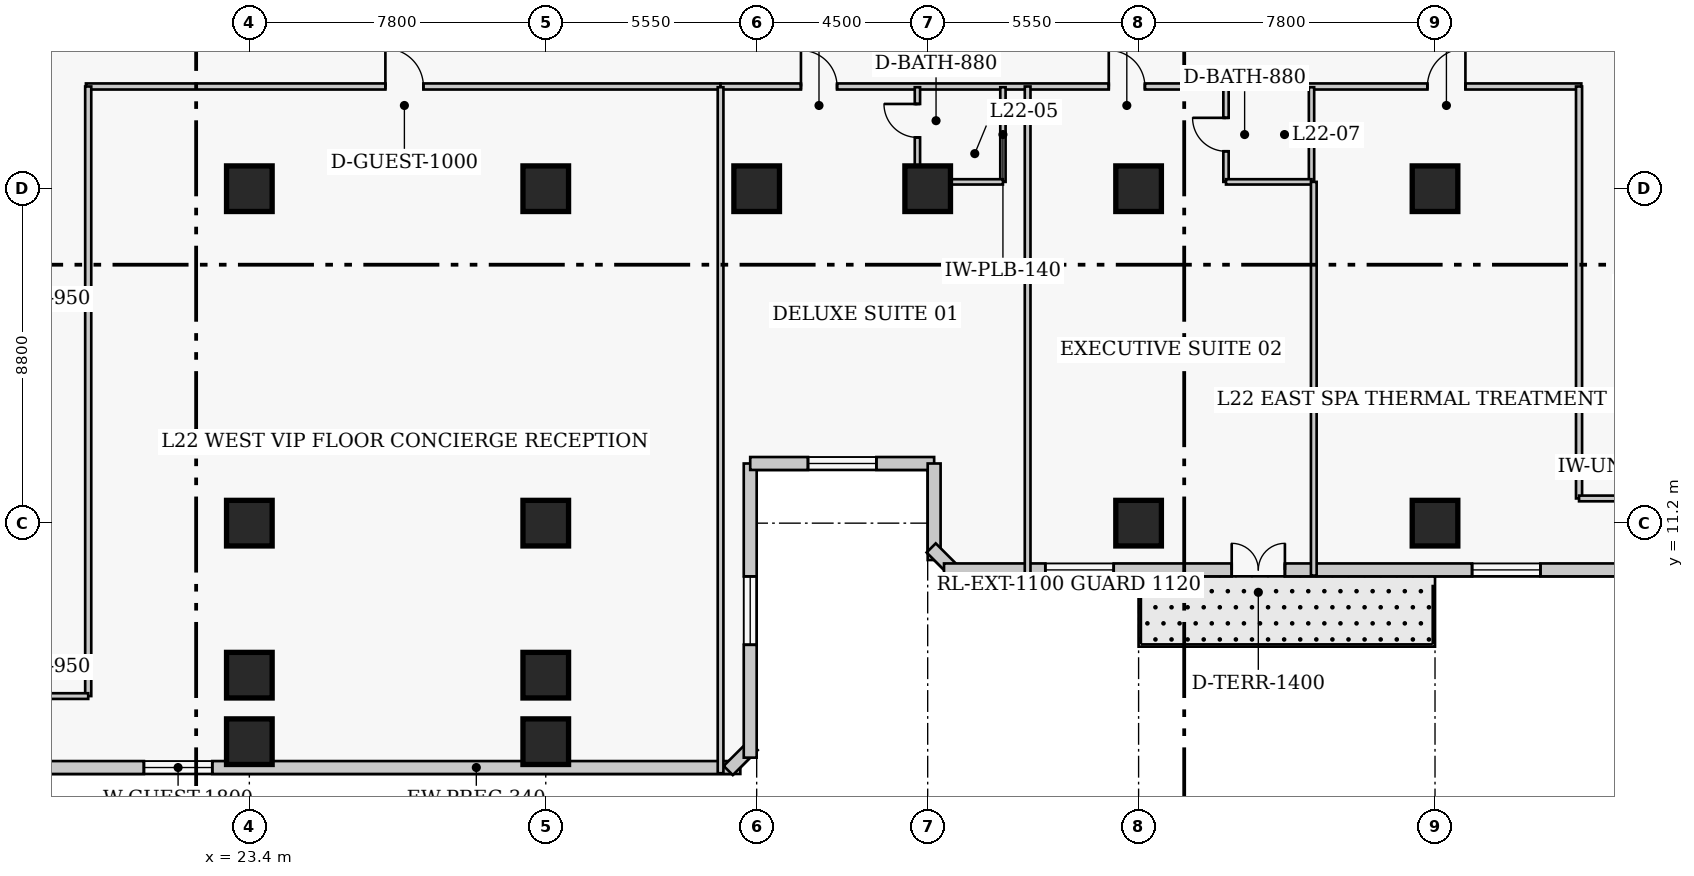
"""IFC4 building model, lengths in metres.
Left out: names, types, materials, properties, quantities, classifications, styles, units other than length and angle.
Written with IfcOpenShell. Run it as: python <this file> out.ifc"""

import sys

from ifc_helpers import new_model, si_unit, direction, frame, frame_2d, origin, origin_2d, place, context, subcontext, project, spatial, rectangle, extrude, element, fill, save


model = new_model("IFC4")
c1 = context("Model", 3, precision=1e-05, world=origin(), true_north=direction((0.0, 1.0)))
c2 = subcontext(c1, "Body", "Model", "MODEL_VIEW")
j1 = project(units=[si_unit("LENGTHUNIT", "METRE"), si_unit("PLANEANGLEUNIT", "RADIAN")], contexts=[c1])
p1 = place(None, origin())
s1 = spatial("IfcSite", under=j1, at=p1, CompositionType="ELEMENT")
p2 = place(p1, origin())
s2 = spatial("IfcBuilding", under=s1, at=p2, CompositionType="ELEMENT")
p3 = place(p2, frame((0.0, 0.0, 91.8)))
s3 = spatial("IfcBuildingStorey", under=s2, at=p3, CompositionType="ELEMENT", Elevation=91.8)
for number, where, z_axis, x_axis in (
    (1, (23.4, 11.2, 0.0), (0.0, 0.0, 1.0), (1.0, 0.0, 0.0)),
    (2, (23.4, 20.0, 0.0), (0.0, 0.0, 1.0), (1.0, 0.0, 0.0)),
    (3, (31.2, 11.2, 0.0), (0.0, 0.0, 1.0), (1.0, 0.0, 0.0)),
    (4, (31.2, 20.0, 0.0), (0.0, 0.0, 1.0), (1.0, 0.0, 0.0)),
    (5, (36.75, 20.0, 0.0), (0.0, 0.0, 1.0), (1.0, 0.0, 0.0)),
    (6, (41.25, 20.0, 0.0), (0.0, 0.0, 1.0), (1.0, 0.0, 0.0)),
    (7, (46.8, 11.2, 0.0), (0.0, 0.0, 1.0), (1.0, 0.0, 0.0)),
    (8, (46.8, 20.0, 0.0), (0.0, 0.0, 1.0), (1.0, 0.0, 0.0)),
    (9, (54.6, 11.2, 0.0), (0.0, 0.0, 1.0), (1.0, 0.0, 0.0)),
    (10, (54.6, 20.0, 0.0), (0.0, 0.0, 1.0), (1.0, 0.0, 0.0)),
    (11, (23.4, 7.2, 0.0), (0.0, 0.0, 1.0), (1.0, 0.0, 0.0)),
    (12, (31.2, 7.2, 0.0), (0.0, 0.0, 1.0), (1.0, 0.0, 0.0)),
    (13, (23.4, 5.45, 0.0), (0.0, 0.0, 1.0), (1.0, 0.0, 0.0)),
    (14, (31.2, 5.45, 0.0), (0.0, 0.0, 1.0), (1.0, 0.0, 0.0)),
):
    element("IfcColumn", number, at=place(p3, frame(where, z_axis=z_axis, x_axis=x_axis)), inside=s3, PredefinedType="COLUMN", context=c2, shape_type="SweptSolid", body=[
        extrude(rectangle(XDim=1.2, YDim=1.2, at=origin_2d()), origin(), (0.0, 0.0, 1.0), 3.8),
    ])
p4 = place(p3, frame((8.03, 4.77, 0.0), z_axis=(0.0, 0.0, 1.0), x_axis=(1.0, 0.0, 0.0)))
e15 = element("IfcWall", 15, at=p4, inside=s3, PredefinedType="SOLIDWALL", context=c2, shape_type="SweptSolid", body=[
    extrude(rectangle(XDim=28.29, YDim=0.34, at=frame_2d((14.145, 0.0))), origin(), (0.0, 0.0, 1.0), 3.54),
])
p5 = place(p4, frame((12.595, 0.0, 0.85)))
e16 = element("IfcOpeningElement", 16, at=p5, cuts=e15, PredefinedType="OPENING", context=c2, shape_type="SweptSolid", body=[
    extrude(rectangle(XDim=1.8, YDim=1.8, at=frame_2d((0.9, 0.9))), frame((0.0, 0.18, 0.0), z_axis=(0.0, -1.0, 0.0), x_axis=(1.0, 0.0, 0.0)), (0.0, 0.0, 1.0), 0.36),
])
p6 = place(p3, frame((36.001, 4.692, 0.0), z_axis=(0.0, 0.0, 1.0), x_axis=(0.707238225886, 0.706975312048, 0.0)))
e17 = element("IfcWall", 17, at=p6, inside=s3, PredefinedType="SOLIDWALL", context=c2, shape_type="SweptSolid", body=[
    extrude(rectangle(XDim=0.929, YDim=0.34, at=frame_2d((0.464, 0.0))), origin(), (0.0, 0.0, 1.0), 3.54),
])
p7 = place(p3, frame((36.58, 5.03, 0.0), z_axis=(0.0, 0.0, 1.0), x_axis=(0.0, 1.0, 0.0)))
e18 = element("IfcWall", 18, at=p7, inside=s3, PredefinedType="SOLIDWALL", context=c2, shape_type="SweptSolid", body=[
    extrude(rectangle(XDim=7.74, YDim=0.34, at=frame_2d((3.87, 0.0))), origin(), (0.0, 0.0, 1.0), 3.54),
])
p8 = place(p7, frame((2.97, 0.0, 0.85)))
e19 = element("IfcOpeningElement", 19, at=p8, cuts=e18, PredefinedType="OPENING", context=c2, shape_type="SweptSolid", body=[
    extrude(rectangle(XDim=1.8, YDim=1.8, at=frame_2d((0.9, 0.9))), frame((0.0, 0.18, 0.0), z_axis=(0.0, -1.0, 0.0), x_axis=(1.0, 0.0, 0.0)), (0.0, 0.0, 1.0), 0.36),
])
p9 = place(p3, frame((36.58, 12.77, 0.0), z_axis=(0.0, 0.0, 1.0), x_axis=(1.0, 0.0, 0.0)))
e20 = element("IfcWall", 20, at=p9, inside=s3, PredefinedType="SOLIDWALL", context=c2, shape_type="SweptSolid", body=[
    extrude(rectangle(XDim=4.84, YDim=0.34, at=frame_2d((2.42, 0.0))), origin(), (0.0, 0.0, 1.0), 3.54),
])
p10 = place(p9, frame((1.52, 0.0, 0.85)))
e21 = element("IfcOpeningElement", 21, at=p10, cuts=e20, PredefinedType="OPENING", context=c2, shape_type="SweptSolid", body=[
    extrude(rectangle(XDim=1.8, YDim=1.8, at=frame_2d((0.9, 0.9))), frame((0.0, 0.18, 0.0), z_axis=(0.0, -1.0, 0.0), x_axis=(1.0, 0.0, 0.0)), (0.0, 0.0, 1.0), 0.36),
])
p11 = place(p3, frame((41.42, 12.77, 0.0), z_axis=(0.0, 0.0, 1.0), x_axis=(0.0, -1.0, 0.0)))
e22 = element("IfcWall", 22, at=p11, inside=s3, PredefinedType="SOLIDWALL", context=c2, shape_type="SweptSolid", body=[
    extrude(rectangle(XDim=2.54, YDim=0.34, at=frame_2d((1.27, 0.0))), origin(), (0.0, 0.0, 1.0), 3.54),
])
p12 = place(p3, frame((41.342, 10.549, 0.0), z_axis=(0.0, 0.0, 1.0), x_axis=(0.707106781187, -0.707106781187, 0.0)))
e23 = element("IfcWall", 23, at=p12, inside=s3, PredefinedType="SOLIDWALL", context=c2, shape_type="SweptSolid", body=[
    extrude(rectangle(XDim=0.929, YDim=0.34, at=frame_2d((0.464, 0.0))), origin(), (0.0, 0.0, 1.0), 3.54),
])
p13 = place(p3, frame((41.68, 9.97, 0.0), z_axis=(0.0, 0.0, 1.0), x_axis=(1.0, 0.0, 0.0)))
e24 = element("IfcWall", 24, at=p13, inside=s3, PredefinedType="SOLIDWALL", context=c2, shape_type="SweptSolid", body=[
    extrude(rectangle(XDim=28.29, YDim=0.34, at=frame_2d((14.145, 0.0))), origin(), (0.0, 0.0, 1.0), 3.54),
])
p14 = place(p13, frame((7.57, 0.0, 0.0)))
e25 = element("IfcOpeningElement", 25, at=p14, cuts=e24, PredefinedType="OPENING", context=c2, shape_type="SweptSolid", body=[
    extrude(rectangle(XDim=1.4, YDim=2.15, at=frame_2d((0.7, 1.075))), frame((0.0, 0.18, 0.0), z_axis=(0.0, -1.0, 0.0), x_axis=(1.0, 0.0, 0.0)), (0.0, 0.0, 1.0), 0.36),
])
p15 = place(p13, frame((2.665, 0.0, 0.85)))
e26 = element("IfcOpeningElement", 26, at=p15, cuts=e24, PredefinedType="OPENING", context=c2, shape_type="SweptSolid", body=[
    extrude(rectangle(XDim=1.8, YDim=1.8, at=frame_2d((0.9, 0.9))), frame((0.0, 0.18, 0.0), z_axis=(0.0, -1.0, 0.0), x_axis=(1.0, 0.0, 0.0)), (0.0, 0.0, 1.0), 0.36),
])
p16 = place(p13, frame((13.895, 0.0, 0.85)))
e27 = element("IfcOpeningElement", 27, at=p16, cuts=e24, PredefinedType="OPENING", context=c2, shape_type="SweptSolid", body=[
    extrude(rectangle(XDim=1.8, YDim=1.8, at=frame_2d((0.9, 0.9))), frame((0.0, 0.18, 0.0), z_axis=(0.0, -1.0, 0.0), x_axis=(1.0, 0.0, 0.0)), (0.0, 0.0, 1.0), 0.36),
])
p17 = place(p3, frame((19.1, 22.69, 0.0), z_axis=(0.0, 0.0, 1.0), x_axis=(1.0, 0.0, 0.0)))
e28 = element("IfcWall", 28, at=p17, inside=s3, PredefinedType="PARTITIONING", context=c2, shape_type="SweptSolid", body=[
    extrude(rectangle(XDim=16.7, YDim=0.16, at=frame_2d((8.35, 0.0))), origin(), (0.0, 0.0, 1.0), 3.54),
])
p18 = place(p17, frame((7.88, 0.0, 0.0)))
e29 = element("IfcOpeningElement", 29, at=p18, cuts=e28, PredefinedType="OPENING", context=c2, shape_type="SweptSolid", body=[
    extrude(rectangle(XDim=1.0, YDim=2.15, at=frame_2d((0.5, 1.075))), frame((0.0, 0.09, 0.0), z_axis=(0.0, -1.0, 0.0), x_axis=(1.0, 0.0, 0.0)), (0.0, 0.0, 1.0), 0.18),
])
p19 = place(p3, frame((35.8, 22.69, 0.0), z_axis=(0.0, 0.0, 1.0), x_axis=(1.0, 0.0, 0.0)))
e30 = element("IfcWall", 30, at=p19, inside=s3, PredefinedType="PARTITIONING", context=c2, shape_type="SweptSolid", body=[
    extrude(rectangle(XDim=22.65, YDim=0.16, at=frame_2d((11.325, 0.0))), origin(), (0.0, 0.0, 1.0), 3.54),
])
p20 = place(p19, frame((2.115, 0.0, 0.0)))
e31 = element("IfcOpeningElement", 31, at=p20, cuts=e30, PredefinedType="OPENING", context=c2, shape_type="SweptSolid", body=[
    extrude(rectangle(XDim=0.95, YDim=2.1, at=frame_2d((0.475, 1.05))), frame((0.0, 0.09, 0.0), z_axis=(0.0, -1.0, 0.0), x_axis=(1.0, 0.0, 0.0)), (0.0, 0.0, 1.0), 0.18),
])
p21 = place(p19, frame((10.215, 0.0, 0.0)))
e32 = element("IfcOpeningElement", 32, at=p21, cuts=e30, PredefinedType="OPENING", context=c2, shape_type="SweptSolid", body=[
    extrude(rectangle(XDim=0.95, YDim=2.1, at=frame_2d((0.475, 1.05))), frame((0.0, 0.09, 0.0), z_axis=(0.0, -1.0, 0.0), x_axis=(1.0, 0.0, 0.0)), (0.0, 0.0, 1.0), 0.18),
])
p22 = place(p19, frame((18.6, 0.0, 0.0)))
e33 = element("IfcOpeningElement", 33, at=p22, cuts=e30, PredefinedType="OPENING", context=c2, shape_type="SweptSolid", body=[
    extrude(rectangle(XDim=1.0, YDim=2.15, at=frame_2d((0.5, 1.075))), frame((0.0, 0.09, 0.0), z_axis=(0.0, -1.0, 0.0), x_axis=(1.0, 0.0, 0.0)), (0.0, 0.0, 1.0), 0.18),
])
p23 = place(p3, frame((19.16, 6.65, 0.0), z_axis=(0.0, 0.0, 1.0), x_axis=(0.0, 1.0, 0.0)))
e34 = element("IfcWall", 34, at=p23, inside=s3, PredefinedType="PARTITIONING", context=c2, shape_type="SweptSolid", body=[
    extrude(rectangle(XDim=16.04, YDim=0.16, at=frame_2d((8.02, 0.0))), origin(), (0.0, 0.0, 1.0), 3.54),
])
p24 = place(p3, frame((58.39, 11.85, 0.0), z_axis=(0.0, 0.0, 1.0), x_axis=(0.0, 1.0, 0.0)))
e35 = element("IfcWall", 35, at=p24, inside=s3, PredefinedType="PARTITIONING", context=c2, shape_type="SweptSolid", body=[
    extrude(rectangle(XDim=10.84, YDim=0.16, at=frame_2d((5.42, 0.0))), origin(), (0.0, 0.0, 1.0), 3.083),
])
p25 = place(p3, frame((58.39, 11.85, 0.0), z_axis=(0.0, 0.0, 1.0), x_axis=(1.0, 0.0, 0.0)))
e36 = element("IfcWall", 36, at=p25, inside=s3, PredefinedType="PARTITIONING", context=c2, shape_type="SweptSolid", body=[
    extrude(rectangle(XDim=2.22, YDim=0.15, at=frame_2d((1.11, 0.0))), origin(), (0.0, 0.0, 1.0), 3.54),
])
p26 = place(p3, frame((16.94, 6.65, 0.0), z_axis=(0.0, 0.0, 1.0), x_axis=(1.0, 0.0, 0.0)))
e37 = element("IfcWall", 37, at=p26, inside=s3, PredefinedType="PARTITIONING", context=c2, shape_type="SweptSolid", body=[
    extrude(rectangle(XDim=2.22, YDim=0.15, at=frame_2d((1.11, 0.0))), origin(), (0.0, 0.0, 1.0), 3.54),
])
p27 = place(p3, frame((35.8, 4.62, 0.0), z_axis=(0.0, 0.0, 1.0), x_axis=(0.0, 1.0, 0.0)))
e38 = element("IfcWall", 38, at=p27, inside=s3, PredefinedType="PARTITIONING", context=c2, shape_type="SweptSolid", body=[
    extrude(rectangle(XDim=18.05, YDim=0.15, at=frame_2d((9.025, 0.0))), origin(), (0.0, 0.0, 1.0), 3.54),
])
p28 = place(p3, frame((40.98, 20.18, 0.0), z_axis=(0.0, 0.0, 1.0), x_axis=(0.0, 1.0, 0.0)))
e39 = element("IfcWall", 39, at=p28, inside=s3, PredefinedType="PLUMBINGWALL", context=c2, shape_type="SweptSolid", body=[
    extrude(rectangle(XDim=2.49, YDim=0.14, at=frame_2d((1.245, 0.0))), origin(), (0.0, 0.0, 1.0), 3.54),
])
p29 = place(p28, frame((1.17, 0.0, 0.0)))
e40 = element("IfcOpeningElement", 40, at=p29, cuts=e39, PredefinedType="OPENING", context=c2, shape_type="SweptSolid", body=[
    extrude(rectangle(XDim=0.88, YDim=2.05, at=frame_2d((0.44, 1.025))), frame((0.0, 0.08, 0.0), z_axis=(0.0, -1.0, 0.0), x_axis=(1.0, 0.0, 0.0)), (0.0, 0.0, 1.0), 0.16),
])
p30 = place(p3, frame((43.23, 20.18, 0.0), z_axis=(0.0, 0.0, 1.0), x_axis=(0.0, 1.0, 0.0)))
e41 = element("IfcWall", 41, at=p30, inside=s3, PredefinedType="PLUMBINGWALL", context=c2, shape_type="SweptSolid", body=[
    extrude(rectangle(XDim=2.49, YDim=0.14, at=frame_2d((1.245, 0.0))), origin(), (0.0, 0.0, 1.0), 3.54),
])
p31 = place(p3, frame((40.98, 20.18, 0.0), z_axis=(0.0, 0.0, 1.0), x_axis=(1.0, 0.0, 0.0)))
e42 = element("IfcWall", 42, at=p31, inside=s3, PredefinedType="PLUMBINGWALL", context=c2, shape_type="SweptSolid", body=[
    extrude(rectangle(XDim=2.25, YDim=0.14, at=frame_2d((1.125, 0.0))), origin(), (0.0, 0.0, 1.0), 2.679),
])
p32 = place(p3, frame((43.88, 9.82, 0.0), z_axis=(0.0, 0.0, 1.0), x_axis=(0.0, 1.0, 0.0)))
e43 = element("IfcWall", 43, at=p32, inside=s3, PredefinedType="PARTITIONING", context=c2, shape_type="SweptSolid", body=[
    extrude(rectangle(XDim=12.87, YDim=0.15, at=frame_2d((6.435, 0.0))), origin(), (0.0, 0.0, 1.0), 3.54),
])
p33 = place(p3, frame((49.1, 20.18, 0.0), z_axis=(0.0, 0.0, 1.0), x_axis=(0.0, 1.0, 0.0)))
e44 = element("IfcWall", 44, at=p33, inside=s3, PredefinedType="PLUMBINGWALL", context=c2, shape_type="SweptSolid", body=[
    extrude(rectangle(XDim=2.49, YDim=0.14, at=frame_2d((1.245, 0.0))), origin(), (0.0, 0.0, 1.0), 3.54),
])
p34 = place(p33, frame((0.805, 0.0, 0.0)))
e45 = element("IfcOpeningElement", 45, at=p34, cuts=e44, PredefinedType="OPENING", context=c2, shape_type="SweptSolid", body=[
    extrude(rectangle(XDim=0.88, YDim=2.05, at=frame_2d((0.44, 1.025))), frame((0.0, 0.08, 0.0), z_axis=(0.0, -1.0, 0.0), x_axis=(1.0, 0.0, 0.0)), (0.0, 0.0, 1.0), 0.16),
])
p35 = place(p3, frame((51.35, 20.18, 0.0), z_axis=(0.0, 0.0, 1.0), x_axis=(0.0, 1.0, 0.0)))
e46 = element("IfcWall", 46, at=p35, inside=s3, PredefinedType="PLUMBINGWALL", context=c2, shape_type="SweptSolid", body=[
    extrude(rectangle(XDim=2.49, YDim=0.14, at=frame_2d((1.245, 0.0))), origin(), (0.0, 0.0, 1.0), 3.54),
])
p36 = place(p3, frame((49.1, 20.18, 0.0), z_axis=(0.0, 0.0, 1.0), x_axis=(1.0, 0.0, 0.0)))
e47 = element("IfcWall", 47, at=p36, inside=s3, PredefinedType="PLUMBINGWALL", context=c2, shape_type="SweptSolid", body=[
    extrude(rectangle(XDim=2.25, YDim=0.14, at=frame_2d((1.125, 0.0))), origin(), (0.0, 0.0, 1.0), 2.679),
])
p37 = place(p3, frame((51.41, 9.82, 0.0), z_axis=(0.0, 0.0, 1.0), x_axis=(0.0, 1.0, 0.0)))
e48 = element("IfcWall", 48, at=p37, inside=s3, PredefinedType="PARTITIONING", context=c2, shape_type="SweptSolid", body=[
    extrude(rectangle(XDim=10.36, YDim=0.15, at=frame_2d((5.18, 0.0))), origin(), (0.0, 0.0, 1.0), 3.54),
])
p38 = place(p5, origin())
e49 = element("IfcWindow", 49, at=p38, inside=s3, PartitioningType="SINGLE_PANEL", PredefinedType="WINDOW", context=c2, shape_type="SweptSolid", body=[
    extrude(rectangle(XDim=1.8, YDim=1.8, at=frame_2d((0.9, 0.9))), frame((0.0, 0.03, 0.0), z_axis=(0.0, -1.0, 0.0), x_axis=(1.0, 0.0, 0.0)), (0.0, 0.0, 1.0), 0.06),
])
fill(e16, e49)
p39 = place(p8, origin())
e50 = element("IfcWindow", 50, at=p39, inside=s3, PartitioningType="SINGLE_PANEL", PredefinedType="WINDOW", context=c2, shape_type="SweptSolid", body=[
    extrude(rectangle(XDim=1.8, YDim=1.8, at=frame_2d((0.9, 0.9))), frame((0.0, 0.03, 0.0), z_axis=(0.0, -1.0, 0.0), x_axis=(1.0, 0.0, 0.0)), (0.0, 0.0, 1.0), 0.06),
])
fill(e19, e50)
p40 = place(p10, origin())
e51 = element("IfcWindow", 51, at=p40, inside=s3, PartitioningType="SINGLE_PANEL", PredefinedType="WINDOW", context=c2, shape_type="SweptSolid", body=[
    extrude(rectangle(XDim=1.8, YDim=1.8, at=frame_2d((0.9, 0.9))), frame((0.0, 0.03, 0.0), z_axis=(0.0, -1.0, 0.0), x_axis=(1.0, 0.0, 0.0)), (0.0, 0.0, 1.0), 0.06),
])
fill(e21, e51)
p41 = place(p14, origin())
e52 = element("IfcDoor", 52, at=p41, inside=s3, OperationType="DOUBLE_DOOR_SINGLE_SWING", PredefinedType="DOOR", context=c2, shape_type="SweptSolid", body=[
    extrude(rectangle(XDim=1.4, YDim=2.15, at=frame_2d((0.7, 1.075))), frame((0.0, 0.025, 0.0), z_axis=(0.0, -1.0, 0.0), x_axis=(1.0, 0.0, 0.0)), (0.0, 0.0, 1.0), 0.05),
])
fill(e25, e52)
p42 = place(p15, origin())
e53 = element("IfcWindow", 53, at=p42, inside=s3, PartitioningType="SINGLE_PANEL", PredefinedType="WINDOW", context=c2, shape_type="SweptSolid", body=[
    extrude(rectangle(XDim=1.8, YDim=1.8, at=frame_2d((0.9, 0.9))), frame((0.0, 0.03, 0.0), z_axis=(0.0, -1.0, 0.0), x_axis=(1.0, 0.0, 0.0)), (0.0, 0.0, 1.0), 0.06),
])
fill(e26, e53)
p43 = place(p16, origin())
e54 = element("IfcWindow", 54, at=p43, inside=s3, PartitioningType="SINGLE_PANEL", PredefinedType="WINDOW", context=c2, shape_type="SweptSolid", body=[
    extrude(rectangle(XDim=1.8, YDim=1.8, at=frame_2d((0.9, 0.9))), frame((0.0, 0.03, 0.0), z_axis=(0.0, -1.0, 0.0), x_axis=(1.0, 0.0, 0.0)), (0.0, 0.0, 1.0), 0.06),
])
fill(e27, e54)
p44 = place(p18, origin())
e55 = element("IfcDoor", 55, at=p44, inside=s3, OperationType="SINGLE_SWING_LEFT", PredefinedType="DOOR", context=c2, shape_type="SweptSolid", body=[
    extrude(rectangle(XDim=1.0, YDim=2.15, at=frame_2d((0.5, 1.075))), frame((0.0, 0.025, 0.0), z_axis=(0.0, -1.0, 0.0), x_axis=(1.0, 0.0, 0.0)), (0.0, 0.0, 1.0), 0.05),
])
fill(e29, e55)
p45 = place(p29, origin())
e56 = element("IfcDoor", 56, at=p45, inside=s3, OperationType="SINGLE_SWING_RIGHT", PredefinedType="DOOR", context=c2, shape_type="SweptSolid", body=[
    extrude(rectangle(XDim=0.88, YDim=2.05, at=frame_2d((0.44, 1.025))), frame((0.0, 0.025, 0.0), z_axis=(0.0, -1.0, 0.0), x_axis=(1.0, 0.0, 0.0)), (0.0, 0.0, 1.0), 0.05),
])
fill(e40, e56)
p46 = place(p20, origin())
e57 = element("IfcDoor", 57, at=p46, inside=s3, OperationType="SINGLE_SWING_LEFT", PredefinedType="DOOR", context=c2, shape_type="SweptSolid", body=[
    extrude(rectangle(XDim=0.95, YDim=2.1, at=frame_2d((0.475, 1.05))), frame((0.0, 0.025, 0.0), z_axis=(0.0, -1.0, 0.0), x_axis=(1.0, 0.0, 0.0)), (0.0, 0.0, 1.0), 0.05),
])
fill(e31, e57)
p47 = place(p34, origin())
e58 = element("IfcDoor", 58, at=p47, inside=s3, OperationType="SINGLE_SWING_RIGHT", PredefinedType="DOOR", context=c2, shape_type="SweptSolid", body=[
    extrude(rectangle(XDim=0.88, YDim=2.05, at=frame_2d((0.44, 1.025))), frame((0.0, 0.025, 0.0), z_axis=(0.0, -1.0, 0.0), x_axis=(1.0, 0.0, 0.0)), (0.0, 0.0, 1.0), 0.05),
])
fill(e45, e58)
p48 = place(p21, origin())
e59 = element("IfcDoor", 59, at=p48, inside=s3, OperationType="SINGLE_SWING_LEFT", PredefinedType="DOOR", context=c2, shape_type="SweptSolid", body=[
    extrude(rectangle(XDim=0.95, YDim=2.1, at=frame_2d((0.475, 1.05))), frame((0.0, 0.025, 0.0), z_axis=(0.0, -1.0, 0.0), x_axis=(1.0, 0.0, 0.0)), (0.0, 0.0, 1.0), 0.05),
])
fill(e32, e59)
p49 = place(p22, origin())
e60 = element("IfcDoor", 60, at=p49, inside=s3, OperationType="SINGLE_SWING_RIGHT", PredefinedType="DOOR", context=c2, shape_type="SweptSolid", body=[
    extrude(rectangle(XDim=1.0, YDim=2.15, at=frame_2d((0.5, 1.075))), frame((0.0, 0.025, 0.0), z_axis=(0.0, -1.0, 0.0), x_axis=(1.0, 0.0, 0.0)), (0.0, 0.0, 1.0), 0.05),
])
fill(e33, e60)
save(model, sys.argv[1])
